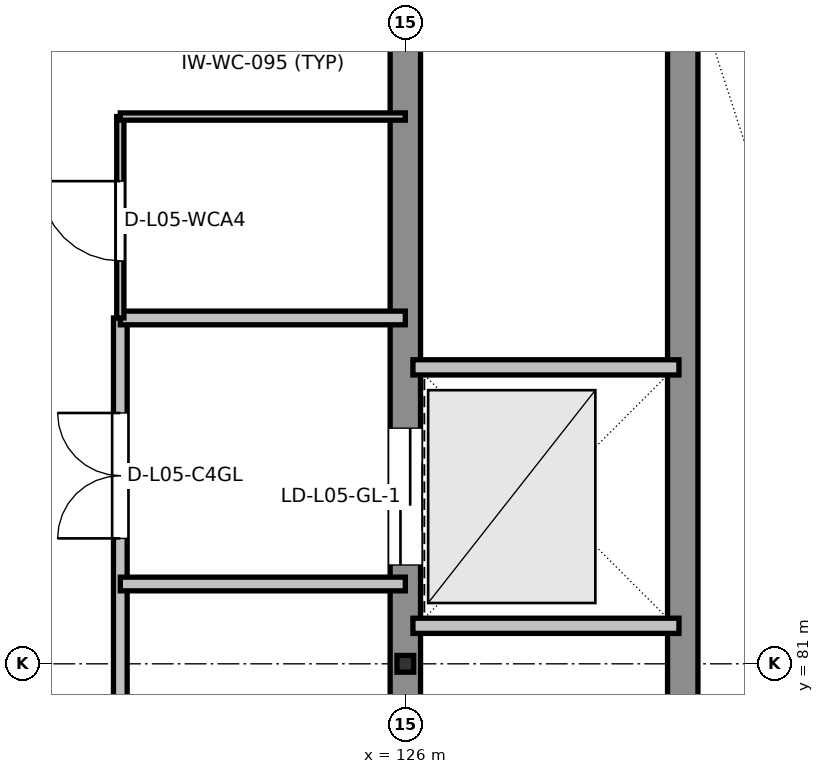
"""IFC4 building model, lengths in metres.
Left out: names, types, materials, properties, quantities, classifications, styles, units other than length and angle.
Written with IfcOpenShell. Run it as: python <this file> out.ifc"""

import sys

from ifc_helpers import new_model, si_unit, direction, frame, frame_2d, origin, origin_2d, place, context, subcontext, project, spatial, rectangle, hollow_rectangle, extrude, element, fill, save


model = new_model("IFC4")
c1 = context("Model", 3, precision=1e-05, world=origin(), true_north=direction((0.0, 1.0)))
c2 = subcontext(c1, "Body", "Model", "MODEL_VIEW")
j1 = project(units=[si_unit("LENGTHUNIT", "METRE"), si_unit("PLANEANGLEUNIT", "RADIAN")], contexts=[c1])
p1 = place(None, origin())
s1 = spatial("IfcSite", under=j1, at=p1, CompositionType="ELEMENT")
p2 = place(p1, origin())
s2 = spatial("IfcBuilding", under=s1, at=p2, CompositionType="ELEMENT")
p3 = place(p2, frame((0.0, 0.0, 23.4)))
s3 = spatial("IfcBuildingStorey", under=s2, at=p3, CompositionType="ELEMENT", Elevation=23.4)
p4 = place(p3, frame((126.0, 81.0, 0.0), z_axis=(0.0, 0.0, 1.0), x_axis=(1.0, 0.0, 0.0)))
e1 = element("IfcColumn", 1, at=p4, inside=s3, PredefinedType="COLUMN", context=c2, shape_type="SweptSolid", body=[
    extrude(hollow_rectangle(XDim=0.22, YDim=0.22, WallThickness=0.012, at=origin_2d()), origin(), (0.0, 0.0, 1.0), 4.2),
])
p5 = place(p3, frame((126.0, 90.0, 0.0), z_axis=(0.0, 0.0, 1.0), x_axis=(0.0, -1.0, 0.0)))
e2 = element("IfcWall", 2, at=p5, inside=s3, PredefinedType="SHEAR", context=c2, shape_type="SweptSolid", body=[
    extrude(rectangle(XDim=18.0, YDim=0.4, at=frame_2d((9.0, 0.0))), origin(), (0.0, 0.0, 1.0), 3.96),
])
p6 = place(p5, frame((16.1, 0.0, 0.0)))
e3 = element("IfcOpeningElement", 3, at=p6, cuts=e2, PredefinedType="OPENING", context=c2, shape_type="SweptSolid", body=[
    extrude(rectangle(XDim=1.1, YDim=2.16, at=frame_2d((0.55, 1.08))), frame((0.0, 0.21, 0.0), z_axis=(0.0, -1.0, 0.0), x_axis=(1.0, 0.0, 0.0)), (0.0, 0.0, 1.0), 0.42),
])
p7 = place(p5, frame((13.45, 0.0, 0.0)))
e4 = element("IfcOpeningElement", 4, at=p7, cuts=e2, PredefinedType="OPENING", context=c2, shape_type="SweptSolid", body=[
    extrude(rectangle(XDim=1.2, YDim=2.2, at=frame_2d((0.6, 1.1))), frame((0.0, 0.21, 0.0), z_axis=(0.0, -1.0, 0.0), x_axis=(1.0, 0.0, 0.0)), (0.0, 0.0, 1.0), 0.42),
])
p8 = place(p5, frame((10.65, 0.0, 0.0)))
e5 = element("IfcOpeningElement", 5, at=p8, cuts=e2, PredefinedType="OPENING", context=c2, shape_type="SweptSolid", body=[
    extrude(rectangle(XDim=1.2, YDim=2.2, at=frame_2d((0.6, 1.1))), frame((0.0, 0.21, 0.0), z_axis=(0.0, -1.0, 0.0), x_axis=(1.0, 0.0, 0.0)), (0.0, 0.0, 1.0), 0.42),
])
p9 = place(p5, frame((5.9, 0.0, 0.0)))
e6 = element("IfcOpeningElement", 6, at=p9, cuts=e2, PredefinedType="OPENING", context=c2, shape_type="SweptSolid", body=[
    extrude(rectangle(XDim=1.8, YDim=2.35, at=frame_2d((0.9, 1.175))), frame((0.0, 0.21, 0.0), z_axis=(0.0, -1.0, 0.0), x_axis=(1.0, 0.0, 0.0)), (0.0, 0.0, 1.0), 0.42),
])
p10 = place(p3, frame((129.65, 72.0, 0.0), z_axis=(0.0, 0.0, 1.0), x_axis=(0.0, 1.0, 0.0)))
e7 = element("IfcWall", 7, at=p10, inside=s3, PredefinedType="SHEAR", context=c2, shape_type="SweptSolid", body=[
    extrude(rectangle(XDim=18.0, YDim=0.4, at=frame_2d((9.0, 0.0))), origin(), (0.0, 0.0, 1.0), 3.96),
])
p11 = place(p10, frame((0.7, 0.0, 0.0)))
e8 = element("IfcOpeningElement", 8, at=p11, cuts=e7, PredefinedType="OPENING", context=c2, shape_type="SweptSolid", body=[
    extrude(rectangle(XDim=1.1, YDim=2.16, at=frame_2d((0.55, 1.08))), frame((0.0, 0.21, 0.0), z_axis=(0.0, -1.0, 0.0), x_axis=(1.0, 0.0, 0.0)), (0.0, 0.0, 1.0), 0.42),
])
for number, where, z_axis, x_axis in (
    (9, (126.1, 81.5, 0.0), (0.0, 0.0, 1.0), (1.0, 0.0, 0.0)),
    (10, (126.1, 84.9, 0.0), (0.0, 0.0, 1.0), (1.0, 0.0, 0.0)),
):
    element("IfcWall", number, at=place(p3, frame(where, z_axis=z_axis, x_axis=x_axis)), inside=s3, PredefinedType="PARTITIONING", context=c2, shape_type="SweptSolid", body=[
        extrude(rectangle(XDim=3.5, YDim=0.2, at=frame_2d((1.75, 0.0))), origin(), (0.0, 0.0, 1.0), 3.96),
    ])
p12 = place(p3, frame((122.25, 72.0, 0.0), z_axis=(0.0, 0.0, 1.0), x_axis=(0.0, 1.0, 0.0)))
e11 = element("IfcWall", 11, at=p12, inside=s3, PredefinedType="PARTITIONING", context=c2, shape_type="SweptSolid", body=[
    extrude(rectangle(XDim=13.55, YDim=0.18, at=frame_2d((6.775, 0.0))), origin(), (0.0, 0.0, 1.0), 3.96),
])
p13 = place(p12, frame((0.75, 0.0, 0.0)))
e12 = element("IfcOpeningElement", 12, at=p13, cuts=e11, PredefinedType="OPENING", context=c2, shape_type="SweptSolid", body=[
    extrude(rectangle(XDim=1.1, YDim=2.16, at=frame_2d((0.55, 1.08))), frame((0.0, 0.1, 0.0), z_axis=(0.0, -1.0, 0.0), x_axis=(1.0, 0.0, 0.0)), (0.0, 0.0, 1.0), 0.2),
])
p14 = place(p12, frame((3.2, 0.0, 0.0)))
e13 = element("IfcOpeningElement", 13, at=p14, cuts=e11, PredefinedType="OPENING", context=c2, shape_type="SweptSolid", body=[
    extrude(rectangle(XDim=1.4, YDim=2.2, at=frame_2d((0.7, 1.1))), frame((0.0, 0.1, 0.0), z_axis=(0.0, -1.0, 0.0), x_axis=(1.0, 0.0, 0.0)), (0.0, 0.0, 1.0), 0.2),
])
p15 = place(p12, frame((6.65, 0.0, 0.0)))
e14 = element("IfcOpeningElement", 14, at=p15, cuts=e11, PredefinedType="OPENING", context=c2, shape_type="SweptSolid", body=[
    extrude(rectangle(XDim=1.4, YDim=2.2, at=frame_2d((0.7, 1.1))), frame((0.0, 0.1, 0.0), z_axis=(0.0, -1.0, 0.0), x_axis=(1.0, 0.0, 0.0)), (0.0, 0.0, 1.0), 0.2),
])
p16 = place(p12, frame((10.65, 0.0, 0.0)))
e15 = element("IfcOpeningElement", 15, at=p16, cuts=e11, PredefinedType="OPENING", context=c2, shape_type="SweptSolid", body=[
    extrude(rectangle(XDim=1.65, YDim=2.25, at=frame_2d((0.825, 1.125))), frame((0.0, 0.1, 0.0), z_axis=(0.0, -1.0, 0.0), x_axis=(1.0, 0.0, 0.0)), (0.0, 0.0, 1.0), 0.2),
])
for number, where, z_axis, x_axis in (
    (16, (122.25, 82.05, 0.0), (0.0, 0.0, 1.0), (1.0, 0.0, 0.0)),
    (17, (122.25, 85.55, 0.0), (0.0, 0.0, 1.0), (1.0, 0.0, 0.0)),
):
    element("IfcWall", number, at=place(p3, frame(where, z_axis=z_axis, x_axis=x_axis)), inside=s3, PredefinedType="PARTITIONING", context=c2, shape_type="SweptSolid", body=[
        extrude(rectangle(XDim=3.75, YDim=0.18, at=frame_2d((1.875, 0.0))), origin(), (0.0, 0.0, 1.0), 3.96),
    ])
p17 = place(p3, frame((122.25, 85.55, 0.0), z_axis=(0.0, 0.0, 1.0), x_axis=(0.0, 1.0, 0.0)))
e18 = element("IfcWall", 18, at=p17, inside=s3, PredefinedType="PARTITIONING", context=c2, shape_type="SweptSolid", body=[
    extrude(rectangle(XDim=2.65, YDim=0.095, at=frame_2d((1.325, 0.0))), origin(), (0.0, 0.0, 1.0), 3.96),
])
p18 = place(p17, frame((0.75, 0.0, 0.0)))
e19 = element("IfcOpeningElement", 19, at=p18, cuts=e18, PredefinedType="OPENING", context=c2, shape_type="SweptSolid", body=[
    extrude(rectangle(XDim=1.05, YDim=2.13, at=frame_2d((0.525, 1.065))), frame((0.0, 0.057, 0.0), z_axis=(0.0, -1.0, 0.0), x_axis=(1.0, 0.0, 0.0)), (0.0, 0.0, 1.0), 0.115),
])
p19 = place(p3, frame((122.25, 88.2, 0.0), z_axis=(0.0, 0.0, 1.0), x_axis=(1.0, 0.0, 0.0)))
e20 = element("IfcWall", 20, at=p19, inside=s3, PredefinedType="PARTITIONING", context=c2, shape_type="SweptSolid", body=[
    extrude(rectangle(XDim=3.75, YDim=0.095, at=frame_2d((1.875, 0.0))), origin(), (0.0, 0.0, 1.0), 3.96),
])
p20 = place(p9, origin())
e21 = element("IfcDoor", 21, at=p20, inside=s3, OperationType="DOUBLE_DOOR_SLIDING", PredefinedType="DOOR", context=c2, shape_type="SweptSolid", body=[
    extrude(rectangle(XDim=1.8, YDim=2.35, at=frame_2d((0.9, 1.175))), frame((0.0, 0.025, 0.0), z_axis=(0.0, -1.0, 0.0), x_axis=(1.0, 0.0, 0.0)), (0.0, 0.0, 1.0), 0.05),
])
fill(e6, e21)
p21 = place(p16, origin())
e22 = element("IfcDoor", 22, at=p21, inside=s3, OperationType="DOUBLE_DOOR_SINGLE_SWING", PredefinedType="DOOR", context=c2, shape_type="SweptSolid", body=[
    extrude(rectangle(XDim=1.65, YDim=2.25, at=frame_2d((0.825, 1.125))), frame((0.0, 0.025, 0.0), z_axis=(0.0, -1.0, 0.0), x_axis=(1.0, 0.0, 0.0)), (0.0, 0.0, 1.0), 0.05),
])
fill(e15, e22)
p22 = place(p18, origin())
e23 = element("IfcDoor", 23, at=p22, inside=s3, OperationType="SINGLE_SWING_RIGHT", PredefinedType="DOOR", context=c2, shape_type="SweptSolid", body=[
    extrude(rectangle(XDim=1.05, YDim=2.13, at=frame_2d((0.525, 1.065))), frame((0.0, 0.025, 0.0), z_axis=(0.0, -1.0, 0.0), x_axis=(1.0, 0.0, 0.0)), (0.0, 0.0, 1.0), 0.05),
])
fill(e19, e23)
save(model, sys.argv[1])
